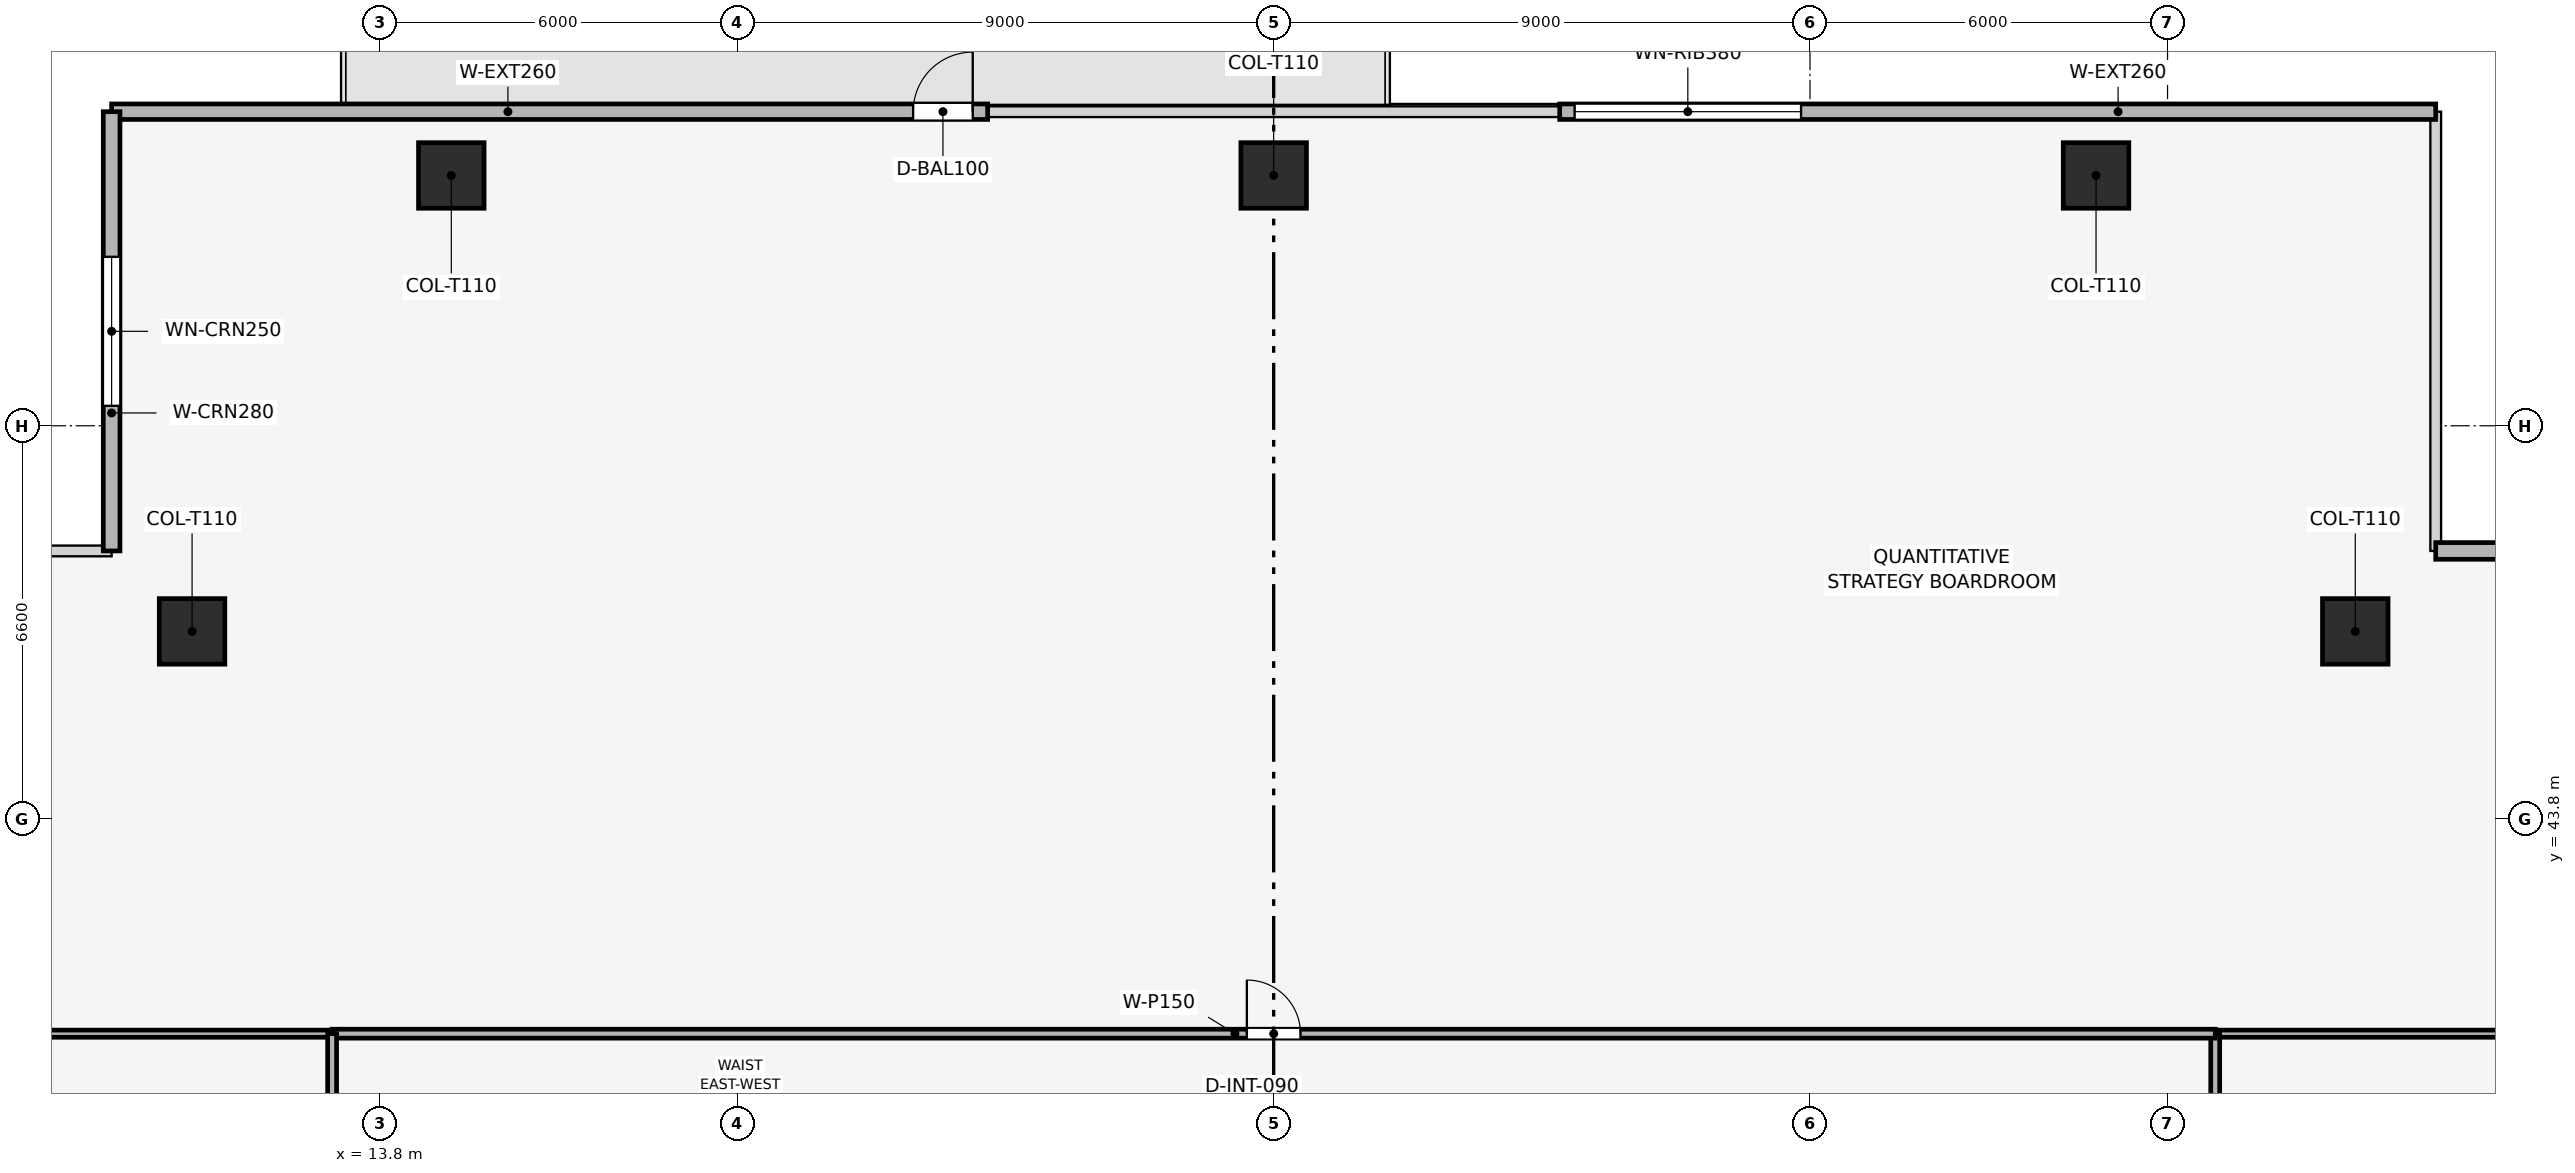
"""IFC4 building model, lengths in metres.
Left out: names, types, materials, properties, quantities, classifications, styles, units other than length and angle.
Written with IfcOpenShell. Run it as: python <this file> out.ifc"""

import sys

from ifc_helpers import new_model, si_unit, direction, frame, frame_2d, origin, origin_2d, place, context, subcontext, project, spatial, rectangle, extrude, element, fill, save


model = new_model("IFC4")
c1 = context("Model", 3, precision=1e-05, world=origin(), true_north=direction((0.0, 1.0)))
c2 = subcontext(c1, "Body", "Model", "MODEL_VIEW")
j1 = project(units=[si_unit("LENGTHUNIT", "METRE"), si_unit("PLANEANGLEUNIT", "RADIAN")], contexts=[c1])
p1 = place(None, origin())
s1 = spatial("IfcSite", under=j1, at=p1, CompositionType="ELEMENT")
p2 = place(p1, origin())
s2 = spatial("IfcBuilding", under=s1, at=p2, CompositionType="ELEMENT")
p3 = place(p2, frame((0.0, 0.0, 199.95)))
s3 = spatial("IfcBuildingStorey", under=s2, at=p3, CompositionType="ELEMENT", Elevation=199.95)
for number, where, z_axis, x_axis in (
    (1, (42.6, 54.6, 0.003), (0.0, 0.0, 1.0), (1.0, 0.0, 0.0)),
    (2, (28.8, 54.6, 0.003), (0.0, 0.0, 1.0), (1.0, 0.0, 0.0)),
    (3, (15.0, 54.6, 0.003), (0.0, 0.0, 1.0), (1.0, 0.0, 0.0)),
    (4, (46.95, 46.95, 0.003), (0.0, 0.0, 1.0), (1.0, 0.0, 0.0)),
    (5, (10.65, 46.95, 0.003), (0.0, 0.0, 1.0), (1.0, 0.0, 0.0)),
):
    element("IfcColumn", number, at=place(p3, frame(where, z_axis=z_axis, x_axis=x_axis)), inside=s3, PredefinedType="COLUMN", context=c2, shape_type="SweptSolid", body=[
        extrude(rectangle(XDim=1.1, YDim=1.1, at=origin_2d()), origin(), (0.0, 0.0, 1.0), 3.494),
    ])
p4 = place(p3, frame((9.3, 55.67, 0.0), z_axis=(0.0, 0.0, 1.0), x_axis=(1.0, 0.0, 0.0)))
e6 = element("IfcWall", 6, at=p4, inside=s3, PredefinedType="SOLIDWALL", context=c2, shape_type="SweptSolid", body=[
    extrude(rectangle(XDim=14.7, YDim=0.26, at=frame_2d((7.35, 0.0))), origin(), (0.0, 0.0, 1.0), 3.5),
])
p5 = place(p4, frame((13.45, 0.0, 0.0)))
e7 = element("IfcOpeningElement", 7, at=p5, cuts=e6, PredefinedType="OPENING", context=c2, shape_type="SweptSolid", body=[
    extrude(rectangle(XDim=1.0, YDim=2.2, at=frame_2d((0.5, 1.1))), frame((0.0, 0.14, 0.0), z_axis=(0.0, -1.0, 0.0), x_axis=(1.0, 0.0, 0.0)), (0.0, 0.0, 1.0), 0.28),
])
p6 = place(p3, frame((33.6, 55.67, 0.0), z_axis=(0.0, 0.0, 1.0), x_axis=(1.0, 0.0, 0.0)))
e8 = element("IfcWall", 8, at=p6, inside=s3, PredefinedType="SOLIDWALL", context=c2, shape_type="SweptSolid", body=[
    extrude(rectangle(XDim=14.7, YDim=0.26, at=frame_2d((7.35, 0.0))), origin(), (0.0, 0.0, 1.0), 3.5),
])
p7 = place(p6, frame((0.25, 0.0, 0.9)))
e9 = element("IfcOpeningElement", 9, at=p7, cuts=e8, PredefinedType="OPENING", context=c2, shape_type="SweptSolid", body=[
    extrude(rectangle(XDim=3.8, YDim=1.9, at=frame_2d((1.9, 0.95))), frame((0.0, 0.14, 0.0), z_axis=(0.0, -1.0, 0.0), x_axis=(1.0, 0.0, 0.0)), (0.0, 0.0, 1.0), 0.28),
])
p8 = place(p3, frame((9.3, 48.3, 0.0), z_axis=(0.0, 0.0, 1.0), x_axis=(0.0, 1.0, 0.0)))
e10 = element("IfcWall", 10, at=p8, inside=s3, PredefinedType="SOLIDWALL", context=c2, shape_type="SweptSolid", body=[
    extrude(rectangle(XDim=7.37, YDim=0.28, at=frame_2d((3.685, 0.0))), origin(), (0.0, 0.0, 1.0), 3.5),
])
p9 = place(p8, frame((2.435, 0.0, 0.9)))
e11 = element("IfcOpeningElement", 11, at=p9, cuts=e10, PredefinedType="OPENING", context=c2, shape_type="SweptSolid", body=[
    extrude(rectangle(XDim=2.5, YDim=1.9, at=frame_2d((1.25, 0.95))), frame((0.0, 0.15, 0.0), z_axis=(0.0, -1.0, 0.0), x_axis=(1.0, 0.0, 0.0)), (0.0, 0.0, 1.0), 0.3),
])
p10 = place(p3, frame((48.3, 48.3, 0.0), z_axis=(0.0, 0.0, 1.0), x_axis=(1.0, 0.0, 0.0)))
e12 = element("IfcWall", 12, at=p10, inside=s3, PredefinedType="SOLIDWALL", context=c2, shape_type="SweptSolid", body=[
    extrude(rectangle(XDim=7.37, YDim=0.28, at=frame_2d((3.685, 0.0))), origin(), (0.0, 0.0, 1.0), 3.5),
])
p11 = place(p10, frame((2.435, 0.0, 0.9)))
e13 = element("IfcOpeningElement", 13, at=p11, cuts=e12, PredefinedType="OPENING", context=c2, shape_type="SweptSolid", body=[
    extrude(rectangle(XDim=2.5, YDim=1.9, at=frame_2d((1.25, 0.95))), frame((0.0, 0.15, 0.0), z_axis=(0.0, -1.0, 0.0), x_axis=(1.0, 0.0, 0.0)), (0.0, 0.0, 1.0), 0.3),
])
p12 = place(p3, frame((1.93, 40.2, 0.0), z_axis=(0.0, 0.0, 1.0), x_axis=(1.0, 0.0, 0.0)))
e14 = element("IfcWall", 14, at=p12, inside=s3, PredefinedType="PARTITIONING", context=c2, shape_type="SweptSolid", body=[
    extrude(rectangle(XDim=11.07, YDim=0.12, at=frame_2d((5.535, 0.0))), origin(), (0.0, 0.0, 1.0), 2.885),
])
p13 = place(p3, frame((44.6, 40.2, 0.0), z_axis=(0.0, 0.0, 1.0), x_axis=(1.0, 0.0, 0.0)))
e15 = element("IfcWall", 15, at=p13, inside=s3, PredefinedType="PARTITIONING", context=c2, shape_type="SweptSolid", body=[
    extrude(rectangle(XDim=11.07, YDim=0.12, at=frame_2d((5.535, 0.0))), origin(), (0.0, 0.0, 1.0), 2.885),
])
p14 = place(p3, frame((44.6, 37.8, 0.0), z_axis=(0.0, 0.0, 1.0), x_axis=(0.0, 1.0, 0.0)))
e16 = element("IfcWall", 16, at=p14, inside=s3, PredefinedType="PARTITIONING", context=c2, shape_type="SweptSolid", body=[
    extrude(rectangle(XDim=2.4, YDim=0.15, at=frame_2d((1.2, 0.0))), origin(), (0.0, 0.0, 1.0), 3.5),
])
p15 = place(p3, frame((13.0, 40.2, 0.0), z_axis=(0.0, 0.0, 1.0), x_axis=(1.0, 0.0, 0.0)))
e17 = element("IfcWall", 17, at=p15, inside=s3, PredefinedType="PARTITIONING", context=c2, shape_type="SweptSolid", body=[
    extrude(rectangle(XDim=31.6, YDim=0.15, at=frame_2d((15.8, 0.0))), origin(), (0.0, 0.0, 1.0), 3.035),
])
p16 = place(p15, frame((15.35, 0.0, 0.0)))
e18 = element("IfcOpeningElement", 18, at=p16, cuts=e17, PredefinedType="OPENING", context=c2, shape_type="SweptSolid", body=[
    extrude(rectangle(XDim=0.9, YDim=2.1, at=frame_2d((0.45, 1.05))), frame((0.0, 0.085, 0.0), z_axis=(0.0, -1.0, 0.0), x_axis=(1.0, 0.0, 0.0)), (0.0, 0.0, 1.0), 0.17),
])
p17 = place(p3, frame((13.0, 17.4, 0.0), z_axis=(0.0, 0.0, 1.0), x_axis=(0.0, 1.0, 0.0)))
e19 = element("IfcWall", 19, at=p17, inside=s3, PredefinedType="PARTITIONING", context=c2, shape_type="SweptSolid", body=[
    extrude(rectangle(XDim=22.8, YDim=0.15, at=frame_2d((11.4, 0.0))), origin(), (0.0, 0.0, 1.0), 3.035),
])
p18 = place(p17, frame((3.1, 0.0, 0.0)))
e20 = element("IfcOpeningElement", 20, at=p18, cuts=e19, PredefinedType="OPENING", context=c2, shape_type="SweptSolid", body=[
    extrude(rectangle(XDim=0.9, YDim=2.1, at=frame_2d((0.45, 1.05))), frame((0.0, 0.085, 0.0), z_axis=(0.0, -1.0, 0.0), x_axis=(1.0, 0.0, 0.0)), (0.0, 0.0, 1.0), 0.17),
])
p19 = place(p17, frame((6.529, 0.0, 0.0)))
e21 = element("IfcOpeningElement", 21, at=p19, cuts=e19, PredefinedType="OPENING", context=c2, shape_type="SweptSolid", body=[
    extrude(rectangle(XDim=0.9, YDim=2.1, at=frame_2d((0.45, 1.05))), frame((0.0, 0.085, 0.0), z_axis=(0.0, -1.0, 0.0), x_axis=(1.0, 0.0, 0.0)), (0.0, 0.0, 1.0), 0.17),
])
p20 = place(p17, frame((10.957, 0.0, 0.0)))
e22 = element("IfcOpeningElement", 22, at=p20, cuts=e19, PredefinedType="OPENING", context=c2, shape_type="SweptSolid", body=[
    extrude(rectangle(XDim=0.9, YDim=2.1, at=frame_2d((0.45, 1.05))), frame((0.0, 0.085, 0.0), z_axis=(0.0, -1.0, 0.0), x_axis=(1.0, 0.0, 0.0)), (0.0, 0.0, 1.0), 0.17),
])
p21 = place(p17, frame((16.527, 0.0, 0.0)))
e23 = element("IfcOpeningElement", 23, at=p21, cuts=e19, PredefinedType="OPENING", context=c2, shape_type="SweptSolid", body=[
    extrude(rectangle(XDim=0.9, YDim=2.1, at=frame_2d((0.45, 1.05))), frame((0.0, 0.085, 0.0), z_axis=(0.0, -1.0, 0.0), x_axis=(1.0, 0.0, 0.0)), (0.0, 0.0, 1.0), 0.17),
])
p22 = place(p5, origin())
e24 = element("IfcDoor", 24, at=p22, inside=s3, OperationType="SINGLE_SWING_RIGHT", PredefinedType="DOOR", context=c2, shape_type="SweptSolid", body=[
    extrude(rectangle(XDim=1.0, YDim=2.2, at=frame_2d((0.5, 1.1))), frame((0.0, 0.025, 0.0), z_axis=(0.0, -1.0, 0.0), x_axis=(1.0, 0.0, 0.0)), (0.0, 0.0, 1.0), 0.05),
])
fill(e7, e24)
p23 = place(p7, origin())
e25 = element("IfcWindow", 25, at=p23, inside=s3, PartitioningType="SINGLE_PANEL", PredefinedType="WINDOW", context=c2, shape_type="SweptSolid", body=[
    extrude(rectangle(XDim=3.8, YDim=1.9, at=frame_2d((1.9, 0.95))), frame((0.0, 0.03, 0.0), z_axis=(0.0, -1.0, 0.0), x_axis=(1.0, 0.0, 0.0)), (0.0, 0.0, 1.0), 0.06),
])
fill(e9, e25)
p24 = place(p9, origin())
e26 = element("IfcWindow", 26, at=p24, inside=s3, PartitioningType="SINGLE_PANEL", PredefinedType="WINDOW", context=c2, shape_type="SweptSolid", body=[
    extrude(rectangle(XDim=2.5, YDim=1.9, at=frame_2d((1.25, 0.95))), frame((0.0, 0.03, 0.0), z_axis=(0.0, -1.0, 0.0), x_axis=(1.0, 0.0, 0.0)), (0.0, 0.0, 1.0), 0.06),
])
fill(e11, e26)
p25 = place(p16, origin())
e27 = element("IfcDoor", 27, at=p25, inside=s3, OperationType="SINGLE_SWING_LEFT", PredefinedType="DOOR", context=c2, shape_type="SweptSolid", body=[
    extrude(rectangle(XDim=0.9, YDim=2.1, at=frame_2d((0.45, 1.05))), frame((0.0, 0.025, 0.0), z_axis=(0.0, -1.0, 0.0), x_axis=(1.0, 0.0, 0.0)), (0.0, 0.0, 1.0), 0.05),
])
fill(e18, e27)
save(model, sys.argv[1])
